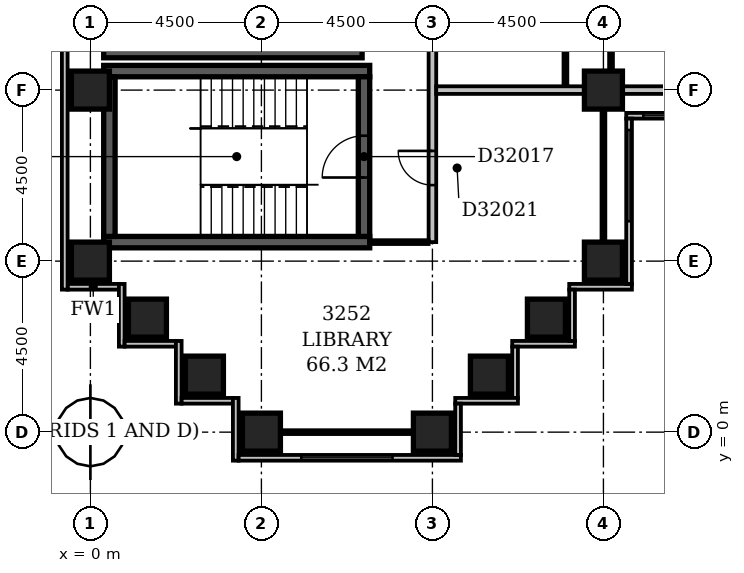
"""IFC4 building model, lengths in metres.
Left out: names, types, materials, properties, quantities, classifications, styles, units other than length and angle.
Written with IfcOpenShell. Run it as: python <this file> out.ifc"""

import sys

from ifc_helpers import new_model, si_unit, direction, frame, frame_2d, origin, origin_2d, place, context, subcontext, project, spatial, rectangle, extrude, element, fill, save


model = new_model("IFC4")
c1 = context("Model", 3, precision=1e-05, world=origin(), true_north=direction((0.0, 1.0)))
c2 = subcontext(c1, "Body", "Model", "MODEL_VIEW")
j1 = project(units=[si_unit("LENGTHUNIT", "METRE"), si_unit("PLANEANGLEUNIT", "RADIAN")], contexts=[c1])
p1 = place(None, origin())
s1 = spatial("IfcSite", under=j1, at=p1, CompositionType="ELEMENT")
p2 = place(p1, origin())
s2 = spatial("IfcBuilding", under=s1, at=p2, CompositionType="ELEMENT")
p3 = place(p2, frame((0.0, 0.0, 130.4)))
s3 = spatial("IfcBuildingStorey", under=s2, at=p3, CompositionType="ELEMENT", Elevation=130.4)
for number, where, z_axis, x_axis in (
    (1, (0.35, 5.0, -0.3), (0.0, 0.0, 1.0), (1.0, 0.0, 0.0)),
    (2, (0.35, 9.5, -0.3), (0.0, 0.0, 1.0), (1.0, 0.0, 0.0)),
):
    element("IfcWall", number, at=place(p3, frame(where, z_axis=z_axis, x_axis=x_axis)), inside=s3, PredefinedType="SHEAR", context=c2, shape_type="SweptSolid", body=[
        extrude(rectangle(XDim=7.0, YDim=0.3, at=frame_2d((3.5, 0.0))), origin(), (0.0, 0.0, 1.0), 3.6),
    ])
p4 = place(p3, frame((0.35, 10.0, -0.3), z_axis=(0.0, 0.0, 1.0), x_axis=(1.0, 0.0, 0.0)))
e3 = element("IfcWall", 3, at=p4, inside=s3, PredefinedType="SHEAR", context=c2, shape_type="SweptSolid", body=[
    extrude(rectangle(XDim=6.8, YDim=0.3, at=frame_2d((3.4, 0.0))), origin(), (0.0, 0.0, 1.0), 3.6),
])
p5 = place(p3, frame((0.5, 5.15, -0.3), z_axis=(0.0, 0.0, 1.0), x_axis=(0.0, 1.0, 0.0)))
e4 = element("IfcWall", 4, at=p5, inside=s3, PredefinedType="SHEAR", context=c2, shape_type="SweptSolid", body=[
    extrude(rectangle(XDim=4.2, YDim=0.3, at=frame_2d((2.1, 0.0))), origin(), (0.0, 0.0, 1.0), 3.6),
])
p6 = place(p3, frame((7.2, 5.15, -0.3), z_axis=(0.0, 0.0, 1.0), x_axis=(0.0, 1.0, 0.0)))
e5 = element("IfcWall", 5, at=p6, inside=s3, PredefinedType="SHEAR", context=c2, shape_type="SweptSolid", body=[
    extrude(rectangle(XDim=4.2, YDim=0.3, at=frame_2d((2.1, 0.0))), origin(), (0.0, 0.0, 1.0), 3.6),
])
p7 = place(p6, frame((1.55, 0.0, 0.3)))
e6 = element("IfcOpeningElement", 6, at=p7, cuts=e5, PredefinedType="OPENING", context=c2, shape_type="SweptSolid", body=[
    extrude(rectangle(XDim=1.1, YDim=2.1, at=frame_2d((0.55, 1.05))), frame((0.0, 0.162, 0.0), z_axis=(0.0, -1.0, 0.0), x_axis=(1.0, 0.0, 0.0)), (0.0, 0.0, 1.0), 0.324),
])
for number, where, z_axis, x_axis in (
    (7, (4.5, 0.0, -0.3), (0.0, 0.0, 1.0), (1.0, 0.0, 0.0)),
    (8, (9.0, 0.0, -0.3), (0.0, 0.0, 1.0), (1.0, 0.0, 0.0)),
    (9, (3.0, 1.5, -0.3), (0.0, 0.0, 1.0), (1.0, 0.0, 0.0)),
    (10, (10.5, 1.5, -0.3), (0.0, 0.0, 1.0), (1.0, 0.0, 0.0)),
    (11, (1.5, 3.0, -0.3), (0.0, 0.0, 1.0), (1.0, 0.0, 0.0)),
    (12, (12.0, 3.0, -0.3), (0.0, 0.0, 1.0), (1.0, 0.0, 0.0)),
    (13, (0.0, 4.5, -0.3), (0.0, 0.0, 1.0), (1.0, 0.0, 0.0)),
    (14, (13.5, 4.5, -0.3), (0.0, 0.0, 1.0), (1.0, 0.0, 0.0)),
    (15, (0.0, 9.0, -0.3), (0.0, 0.0, 1.0), (1.0, 0.0, 0.0)),
    (16, (13.5, 9.0, -0.3), (0.0, 0.0, 1.0), (1.0, 0.0, 0.0)),
):
    element("IfcColumn", number, at=place(p3, frame(where, z_axis=z_axis, x_axis=x_axis)), inside=s3, PredefinedType="COLUMN", context=c2, shape_type="SweptSolid", body=[
        extrude(rectangle(XDim=1.0, YDim=1.0, at=origin_2d()), origin(), (0.0, 0.0, 1.0), 3.6),
    ])
p8 = place(p3, frame((9.675, -0.6, 0.0), z_axis=(0.0, 0.0, 1.0), x_axis=(0.0, 1.0, 0.0)))
e17 = element("IfcWall", 17, at=p8, inside=s3, PredefinedType="STANDARD", context=c2, shape_type="SweptSolid", body=[
    extrude(rectangle(XDim=1.35, YDim=0.15, at=frame_2d((0.675, 0.0))), origin(), (0.0, 0.0, 1.0), 2.7),
])
p9 = place(p3, frame((9.6, 0.825, 0.0), z_axis=(0.0, 0.0, 1.0), x_axis=(1.0, 0.0, 0.0)))
e18 = element("IfcWall", 18, at=p9, inside=s3, PredefinedType="STANDARD", context=c2, shape_type="SweptSolid", body=[
    extrude(rectangle(XDim=1.65, YDim=0.15, at=frame_2d((0.825, 0.0))), origin(), (0.0, 0.0, 1.0), 2.7),
])
p10 = place(p3, frame((11.175, 0.9, 0.0), z_axis=(0.0, 0.0, 1.0), x_axis=(0.0, 1.0, 0.0)))
e19 = element("IfcWall", 19, at=p10, inside=s3, PredefinedType="STANDARD", context=c2, shape_type="SweptSolid", body=[
    extrude(rectangle(XDim=1.35, YDim=0.15, at=frame_2d((0.675, 0.0))), origin(), (0.0, 0.0, 1.0), 2.7),
])
p11 = place(p3, frame((11.1, 2.325, 0.0), z_axis=(0.0, 0.0, 1.0), x_axis=(1.0, 0.0, 0.0)))
e20 = element("IfcWall", 20, at=p11, inside=s3, PredefinedType="STANDARD", context=c2, shape_type="SweptSolid", body=[
    extrude(rectangle(XDim=1.65, YDim=0.15, at=frame_2d((0.825, 0.0))), origin(), (0.0, 0.0, 1.0), 2.7),
])
p12 = place(p3, frame((12.675, 2.4, 0.0), z_axis=(0.0, 0.0, 1.0), x_axis=(0.0, 1.0, 0.0)))
e21 = element("IfcWall", 21, at=p12, inside=s3, PredefinedType="STANDARD", context=c2, shape_type="SweptSolid", body=[
    extrude(rectangle(XDim=1.35, YDim=0.15, at=frame_2d((0.675, 0.0))), origin(), (0.0, 0.0, 1.0), 2.7),
])
p13 = place(p3, frame((12.6, 3.825, 0.0), z_axis=(0.0, 0.0, 1.0), x_axis=(1.0, 0.0, 0.0)))
e22 = element("IfcWall", 22, at=p13, inside=s3, PredefinedType="STANDARD", context=c2, shape_type="SweptSolid", body=[
    extrude(rectangle(XDim=1.65, YDim=0.15, at=frame_2d((0.825, 0.0))), origin(), (0.0, 0.0, 1.0), 2.7),
])
p14 = place(p3, frame((14.175, 3.9, 0.0), z_axis=(0.0, 0.0, 1.0), x_axis=(0.0, 1.0, 0.0)))
e23 = element("IfcWall", 23, at=p14, inside=s3, PredefinedType="STANDARD", context=c2, shape_type="SweptSolid", body=[
    extrude(rectangle(XDim=4.35, YDim=0.15, at=frame_2d((2.175, 0.0))), origin(), (0.0, 0.0, 1.0), 2.7),
])
p15 = place(p14, frame((1.65, 0.0, 0.6)))
e24 = element("IfcOpeningElement", 24, at=p15, cuts=e23, PredefinedType="OPENING", context=c2, shape_type="SweptSolid", body=[
    extrude(rectangle(XDim=2.4, YDim=1.8, at=frame_2d((1.2, 0.9))), frame((0.0, 0.087, 0.0), z_axis=(0.0, -1.0, 0.0), x_axis=(1.0, 0.0, 0.0)), (0.0, 0.0, 1.0), 0.174),
])
p16 = place(p3, frame((14.1, 8.325, 0.0), z_axis=(0.0, 0.0, 1.0), x_axis=(1.0, 0.0, 0.0)))
e25 = element("IfcWall", 25, at=p16, inside=s3, PredefinedType="STANDARD", context=c2, shape_type="SweptSolid", body=[
    extrude(rectangle(XDim=4.65, YDim=0.15, at=frame_2d((2.325, 0.0))), origin(), (0.0, 0.0, 1.0), 2.7),
])
p17 = place(p16, frame((0.45, 0.0, 0.6)))
e26 = element("IfcOpeningElement", 26, at=p17, cuts=e25, PredefinedType="OPENING", context=c2, shape_type="SweptSolid", body=[
    extrude(rectangle(XDim=2.4, YDim=1.8, at=frame_2d((1.2, 0.9))), frame((0.0, 0.087, 0.0), z_axis=(0.0, -1.0, 0.0), x_axis=(1.0, 0.0, 0.0)), (0.0, 0.0, 1.0), 0.174),
])
p18 = place(p3, frame((-0.675, 59.1, 0.0), z_axis=(0.0, 0.0, 1.0), x_axis=(0.0, -1.0, 0.0)))
e27 = element("IfcWall", 27, at=p18, inside=s3, PredefinedType="STANDARD", context=c2, shape_type="SweptSolid", body=[
    extrude(rectangle(XDim=55.35, YDim=0.15, at=frame_2d((27.675, 0.0))), origin(), (0.0, 0.0, 1.0), 2.7),
])
p19 = place(p3, frame((-0.6, 3.825, 0.0), z_axis=(0.0, 0.0, 1.0), x_axis=(1.0, 0.0, 0.0)))
e28 = element("IfcWall", 28, at=p19, inside=s3, PredefinedType="STANDARD", context=c2, shape_type="SweptSolid", body=[
    extrude(rectangle(XDim=1.35, YDim=0.15, at=frame_2d((0.675, 0.0))), origin(), (0.0, 0.0, 1.0), 2.7),
])
p20 = place(p3, frame((0.825, 3.9, 0.0), z_axis=(0.0, 0.0, 1.0), x_axis=(0.0, -1.0, 0.0)))
e29 = element("IfcWall", 29, at=p20, inside=s3, PredefinedType="STANDARD", context=c2, shape_type="SweptSolid", body=[
    extrude(rectangle(XDim=1.65, YDim=0.15, at=frame_2d((0.825, 0.0))), origin(), (0.0, 0.0, 1.0), 2.7),
])
p21 = place(p3, frame((0.9, 2.325, 0.0), z_axis=(0.0, 0.0, 1.0), x_axis=(1.0, 0.0, 0.0)))
e30 = element("IfcWall", 30, at=p21, inside=s3, PredefinedType="STANDARD", context=c2, shape_type="SweptSolid", body=[
    extrude(rectangle(XDim=1.35, YDim=0.15, at=frame_2d((0.675, 0.0))), origin(), (0.0, 0.0, 1.0), 2.7),
])
p22 = place(p3, frame((2.325, 2.4, 0.0), z_axis=(0.0, 0.0, 1.0), x_axis=(0.0, -1.0, 0.0)))
e31 = element("IfcWall", 31, at=p22, inside=s3, PredefinedType="STANDARD", context=c2, shape_type="SweptSolid", body=[
    extrude(rectangle(XDim=1.65, YDim=0.15, at=frame_2d((0.825, 0.0))), origin(), (0.0, 0.0, 1.0), 2.7),
])
p23 = place(p3, frame((2.4, 0.825, 0.0), z_axis=(0.0, 0.0, 1.0), x_axis=(1.0, 0.0, 0.0)))
e32 = element("IfcWall", 32, at=p23, inside=s3, PredefinedType="STANDARD", context=c2, shape_type="SweptSolid", body=[
    extrude(rectangle(XDim=1.35, YDim=0.15, at=frame_2d((0.675, 0.0))), origin(), (0.0, 0.0, 1.0), 2.7),
])
p24 = place(p3, frame((3.825, 0.9, 0.0), z_axis=(0.0, 0.0, 1.0), x_axis=(0.0, -1.0, 0.0)))
e33 = element("IfcWall", 33, at=p24, inside=s3, PredefinedType="STANDARD", context=c2, shape_type="SweptSolid", body=[
    extrude(rectangle(XDim=1.65, YDim=0.15, at=frame_2d((0.825, 0.0))), origin(), (0.0, 0.0, 1.0), 2.7),
])
p25 = place(p3, frame((3.9, -0.675, 0.0), z_axis=(0.0, 0.0, 1.0), x_axis=(1.0, 0.0, 0.0)))
e34 = element("IfcWall", 34, at=p25, inside=s3, PredefinedType="STANDARD", context=c2, shape_type="SweptSolid", body=[
    extrude(rectangle(XDim=5.85, YDim=0.15, at=frame_2d((2.925, 0.0))), origin(), (0.0, 0.0, 1.0), 2.7),
])
p26 = place(p25, frame((1.65, 0.0, 0.6)))
e35 = element("IfcOpeningElement", 35, at=p26, cuts=e34, PredefinedType="OPENING", context=c2, shape_type="SweptSolid", body=[
    extrude(rectangle(XDim=2.4, YDim=1.8, at=frame_2d((1.2, 0.9))), frame((0.0, 0.087, 0.0), z_axis=(0.0, -1.0, 0.0), x_axis=(1.0, 0.0, 0.0)), (0.0, 0.0, 1.0), 0.174),
])
p27 = place(p3, frame((5.0, 0.0, 0.0), z_axis=(0.0, 0.0, 1.0), x_axis=(1.0, 0.0, 0.0)))
e36 = element("IfcWall", 36, at=p27, inside=s3, PredefinedType="PARTITIONING", context=c2, shape_type="SweptSolid", body=[
    extrude(rectangle(XDim=3.5, YDim=0.1, at=frame_2d((1.75, 0.0))), origin(), (0.0, 0.0, 1.0), 2.7),
])
p28 = place(p3, frame((0.0, 4.5, 0.0), z_axis=(0.0, 0.0, 1.0), x_axis=(0.0, 1.0, 0.0)))
e37 = element("IfcWall", 37, at=p28, inside=s3, PredefinedType="PARTITIONING", context=c2, shape_type="SweptSolid", body=[
    extrude(rectangle(XDim=0.5, YDim=0.1, at=frame_2d((0.25, 0.0))), origin(), (0.0, 0.0, 1.0), 2.7),
])
p29 = place(p3, frame((7.349, 5.0, 0.0), z_axis=(0.0, 0.0, 1.0), x_axis=(1.0, 0.0, 0.0)))
e38 = element("IfcWall", 38, at=p29, inside=s3, PredefinedType="PARTITIONING", context=c2, shape_type="SweptSolid", body=[
    extrude(rectangle(XDim=1.551, YDim=0.1, at=frame_2d((0.775, 0.0))), origin(), (0.0, 0.0, 1.0), 3.3),
])
p30 = place(p3, frame((9.0, 5.0, 0.0), z_axis=(0.0, 0.0, 1.0), x_axis=(0.0, 1.0, 0.0)))
e39 = element("IfcWall", 39, at=p30, inside=s3, PredefinedType="PARTITIONING", context=c2, shape_type="SweptSolid", body=[
    extrude(rectangle(XDim=27.75, YDim=0.2, at=frame_2d((13.875, 0.0))), origin(), (0.0, 0.0, 1.0), 3.3),
])
p31 = place(p30, frame((23.95, 0.0, 0.0)))
e40 = element("IfcOpeningElement", 40, at=p31, cuts=e39, PredefinedType="OPENING", context=c2, shape_type="SweptSolid", body=[
    extrude(rectangle(XDim=1.0, YDim=2.1, at=frame_2d((0.5, 1.05))), frame((0.0, 0.112, 0.0), z_axis=(0.0, -1.0, 0.0), x_axis=(1.0, 0.0, 0.0)), (0.0, 0.0, 1.0), 0.224),
])
p32 = place(p30, frame((13.3, 0.0, 0.0)))
e41 = element("IfcOpeningElement", 41, at=p32, cuts=e39, PredefinedType="OPENING", context=c2, shape_type="SweptSolid", body=[
    extrude(rectangle(XDim=1.0, YDim=2.1, at=frame_2d((0.5, 1.05))), frame((0.0, 0.112, 0.0), z_axis=(0.0, -1.0, 0.0), x_axis=(1.0, 0.0, 0.0)), (0.0, 0.0, 1.0), 0.224),
])
p33 = place(p30, frame((11.7, 0.0, 0.0)))
e42 = element("IfcOpeningElement", 42, at=p33, cuts=e39, PredefinedType="OPENING", context=c2, shape_type="SweptSolid", body=[
    extrude(rectangle(XDim=1.0, YDim=2.1, at=frame_2d((0.5, 1.05))), frame((0.0, 0.112, 0.0), z_axis=(0.0, -1.0, 0.0), x_axis=(1.0, 0.0, 0.0)), (0.0, 0.0, 1.0), 0.224),
])
p34 = place(p30, frame((1.5, 0.0, 0.0)))
e43 = element("IfcOpeningElement", 43, at=p34, cuts=e39, PredefinedType="OPENING", context=c2, shape_type="SweptSolid", body=[
    extrude(rectangle(XDim=0.9, YDim=2.1, at=frame_2d((0.45, 1.05))), frame((0.0, 0.112, 0.0), z_axis=(0.0, -1.0, 0.0), x_axis=(1.0, 0.0, 0.0)), (0.0, 0.0, 1.0), 0.224),
])
p35 = place(p3, frame((13.5, 5.0, 0.0), z_axis=(0.0, 0.0, 1.0), x_axis=(0.0, 1.0, 0.0)))
e44 = element("IfcWall", 44, at=p35, inside=s3, PredefinedType="PARTITIONING", context=c2, shape_type="SweptSolid", body=[
    extrude(rectangle(XDim=3.5, YDim=0.1, at=frame_2d((1.75, 0.0))), origin(), (0.0, 0.0, 1.0), 2.7),
])
p36 = place(p3, frame((9.1, 9.0, 0.0), z_axis=(0.0, 0.0, 1.0), x_axis=(1.0, 0.0, 0.0)))
e45 = element("IfcWall", 45, at=p36, inside=s3, PredefinedType="PARTITIONING", context=c2, shape_type="SweptSolid", body=[
    extrude(rectangle(XDim=3.9, YDim=0.2, at=frame_2d((1.95, 0.0))), origin(), (0.0, 0.0, 1.0), 3.3),
])
p37 = place(p3, frame((14.0, 9.0, 0.0), z_axis=(0.0, 0.0, 1.0), x_axis=(1.0, 0.0, 0.0)))
e46 = element("IfcWall", 46, at=p37, inside=s3, PredefinedType="PARTITIONING", context=c2, shape_type="SweptSolid", body=[
    extrude(rectangle(XDim=3.5, YDim=0.2, at=frame_2d((1.75, 0.0))), origin(), (0.0, 0.0, 1.0), 2.7),
])
p38 = place(p3, frame((12.5, 9.1, 0.0), z_axis=(0.0, 0.0, 1.0), x_axis=(0.0, 1.0, 0.0)))
e47 = element("IfcWall", 47, at=p38, inside=s3, PredefinedType="PARTITIONING", context=c2, shape_type="SweptSolid", body=[
    extrude(rectangle(XDim=7.3, YDim=0.1, at=frame_2d((3.65, 0.0))), origin(), (0.0, 0.0, 1.0), 3.3),
])
p39 = place(p38, frame((5.7, 0.0, 0.0)))
e48 = element("IfcOpeningElement", 48, at=p39, cuts=e47, PredefinedType="OPENING", context=c2, shape_type="SweptSolid", body=[
    extrude(rectangle(XDim=0.8, YDim=2.1, at=frame_2d((0.4, 1.05))), frame((0.0, 0.062, 0.0), z_axis=(0.0, -1.0, 0.0), x_axis=(1.0, 0.0, 0.0)), (0.0, 0.0, 1.0), 0.124),
])
p40 = place(p38, frame((1.95, 0.0, 0.0)))
e49 = element("IfcOpeningElement", 49, at=p40, cuts=e47, PredefinedType="OPENING", context=c2, shape_type="SweptSolid", body=[
    extrude(rectangle(XDim=0.9, YDim=2.1, at=frame_2d((0.45, 1.05))), frame((0.0, 0.062, 0.0), z_axis=(0.0, -1.0, 0.0), x_axis=(1.0, 0.0, 0.0)), (0.0, 0.0, 1.0), 0.124),
])
p41 = place(p3, frame((13.7, 9.5, 0.0), z_axis=(0.0, 0.0, 1.0), x_axis=(0.0, 1.0, 0.0)))
e50 = element("IfcWall", 50, at=p41, inside=s3, PredefinedType="PARTITIONING", context=c2, shape_type="SweptSolid", body=[
    extrude(rectangle(XDim=8.4, YDim=0.1, at=frame_2d((4.2, 0.0))), origin(), (0.0, 0.0, 1.0), 3.3),
])
p42 = place(p41, frame((1.3, 0.0, 0.0)))
e51 = element("IfcOpeningElement", 51, at=p42, cuts=e50, PredefinedType="OPENING", context=c2, shape_type="SweptSolid", body=[
    extrude(rectangle(XDim=0.9, YDim=2.1, at=frame_2d((0.45, 1.05))), frame((0.0, 0.062, 0.0), z_axis=(0.0, -1.0, 0.0), x_axis=(1.0, 0.0, 0.0)), (0.0, 0.0, 1.0), 0.124),
])
p43 = place(p41, frame((5.8, 0.0, 0.0)))
e52 = element("IfcOpeningElement", 52, at=p43, cuts=e50, PredefinedType="OPENING", context=c2, shape_type="SweptSolid", body=[
    extrude(rectangle(XDim=0.9, YDim=2.1, at=frame_2d((0.45, 1.05))), frame((0.0, 0.062, 0.0), z_axis=(0.0, -1.0, 0.0), x_axis=(1.0, 0.0, 0.0)), (0.0, 0.0, 1.0), 0.124),
])
p44 = place(p15, origin())
e53 = element("IfcWindow", 53, at=p44, inside=s3, PartitioningType="SINGLE_PANEL", PredefinedType="WINDOW", context=c2, shape_type="SweptSolid", body=[
    extrude(rectangle(XDim=2.4, YDim=1.8, at=frame_2d((1.2, 0.9))), frame((0.0, 0.03, 0.0), z_axis=(0.0, -1.0, 0.0), x_axis=(1.0, 0.0, 0.0)), (0.0, 0.0, 1.0), 0.06),
])
fill(e24, e53)
p45 = place(p17, origin())
e54 = element("IfcWindow", 54, at=p45, inside=s3, PartitioningType="SINGLE_PANEL", PredefinedType="WINDOW", context=c2, shape_type="SweptSolid", body=[
    extrude(rectangle(XDim=2.4, YDim=1.8, at=frame_2d((1.2, 0.9))), frame((0.0, 0.03, 0.0), z_axis=(0.0, -1.0, 0.0), x_axis=(1.0, 0.0, 0.0)), (0.0, 0.0, 1.0), 0.06),
])
fill(e26, e54)
p46 = place(p26, origin())
e55 = element("IfcWindow", 55, at=p46, inside=s3, PartitioningType="SINGLE_PANEL", PredefinedType="WINDOW", context=c2, shape_type="SweptSolid", body=[
    extrude(rectangle(XDim=2.4, YDim=1.8, at=frame_2d((1.2, 0.9))), frame((0.0, 0.03, 0.0), z_axis=(0.0, -1.0, 0.0), x_axis=(1.0, 0.0, 0.0)), (0.0, 0.0, 1.0), 0.06),
])
fill(e35, e55)
p47 = place(p7, origin())
e56 = element("IfcDoor", 56, at=p47, inside=s3, OperationType="SINGLE_SWING_LEFT", PredefinedType="DOOR", context=c2, shape_type="SweptSolid", body=[
    extrude(rectangle(XDim=1.1, YDim=2.1, at=frame_2d((0.55, 1.05))), frame((0.0, 0.025, 0.0), z_axis=(0.0, -1.0, 0.0), x_axis=(1.0, 0.0, 0.0)), (0.0, 0.0, 1.0), 0.05),
])
fill(e6, e56)
p48 = place(p34, frame((0.9, 0.0, 0.0), z_axis=(0.0, 0.0, 1.0), x_axis=(-1.0, 0.0, 0.0)))
e57 = element("IfcDoor", 57, at=p48, inside=s3, OperationType="SINGLE_SWING_LEFT", PredefinedType="DOOR", context=c2, shape_type="SweptSolid", body=[
    extrude(rectangle(XDim=0.9, YDim=2.1, at=frame_2d((0.45, 1.05))), frame((0.0, 0.025, 0.0), z_axis=(0.0, -1.0, 0.0), x_axis=(1.0, 0.0, 0.0)), (0.0, 0.0, 1.0), 0.05),
])
fill(e43, e57)
save(model, sys.argv[1])
